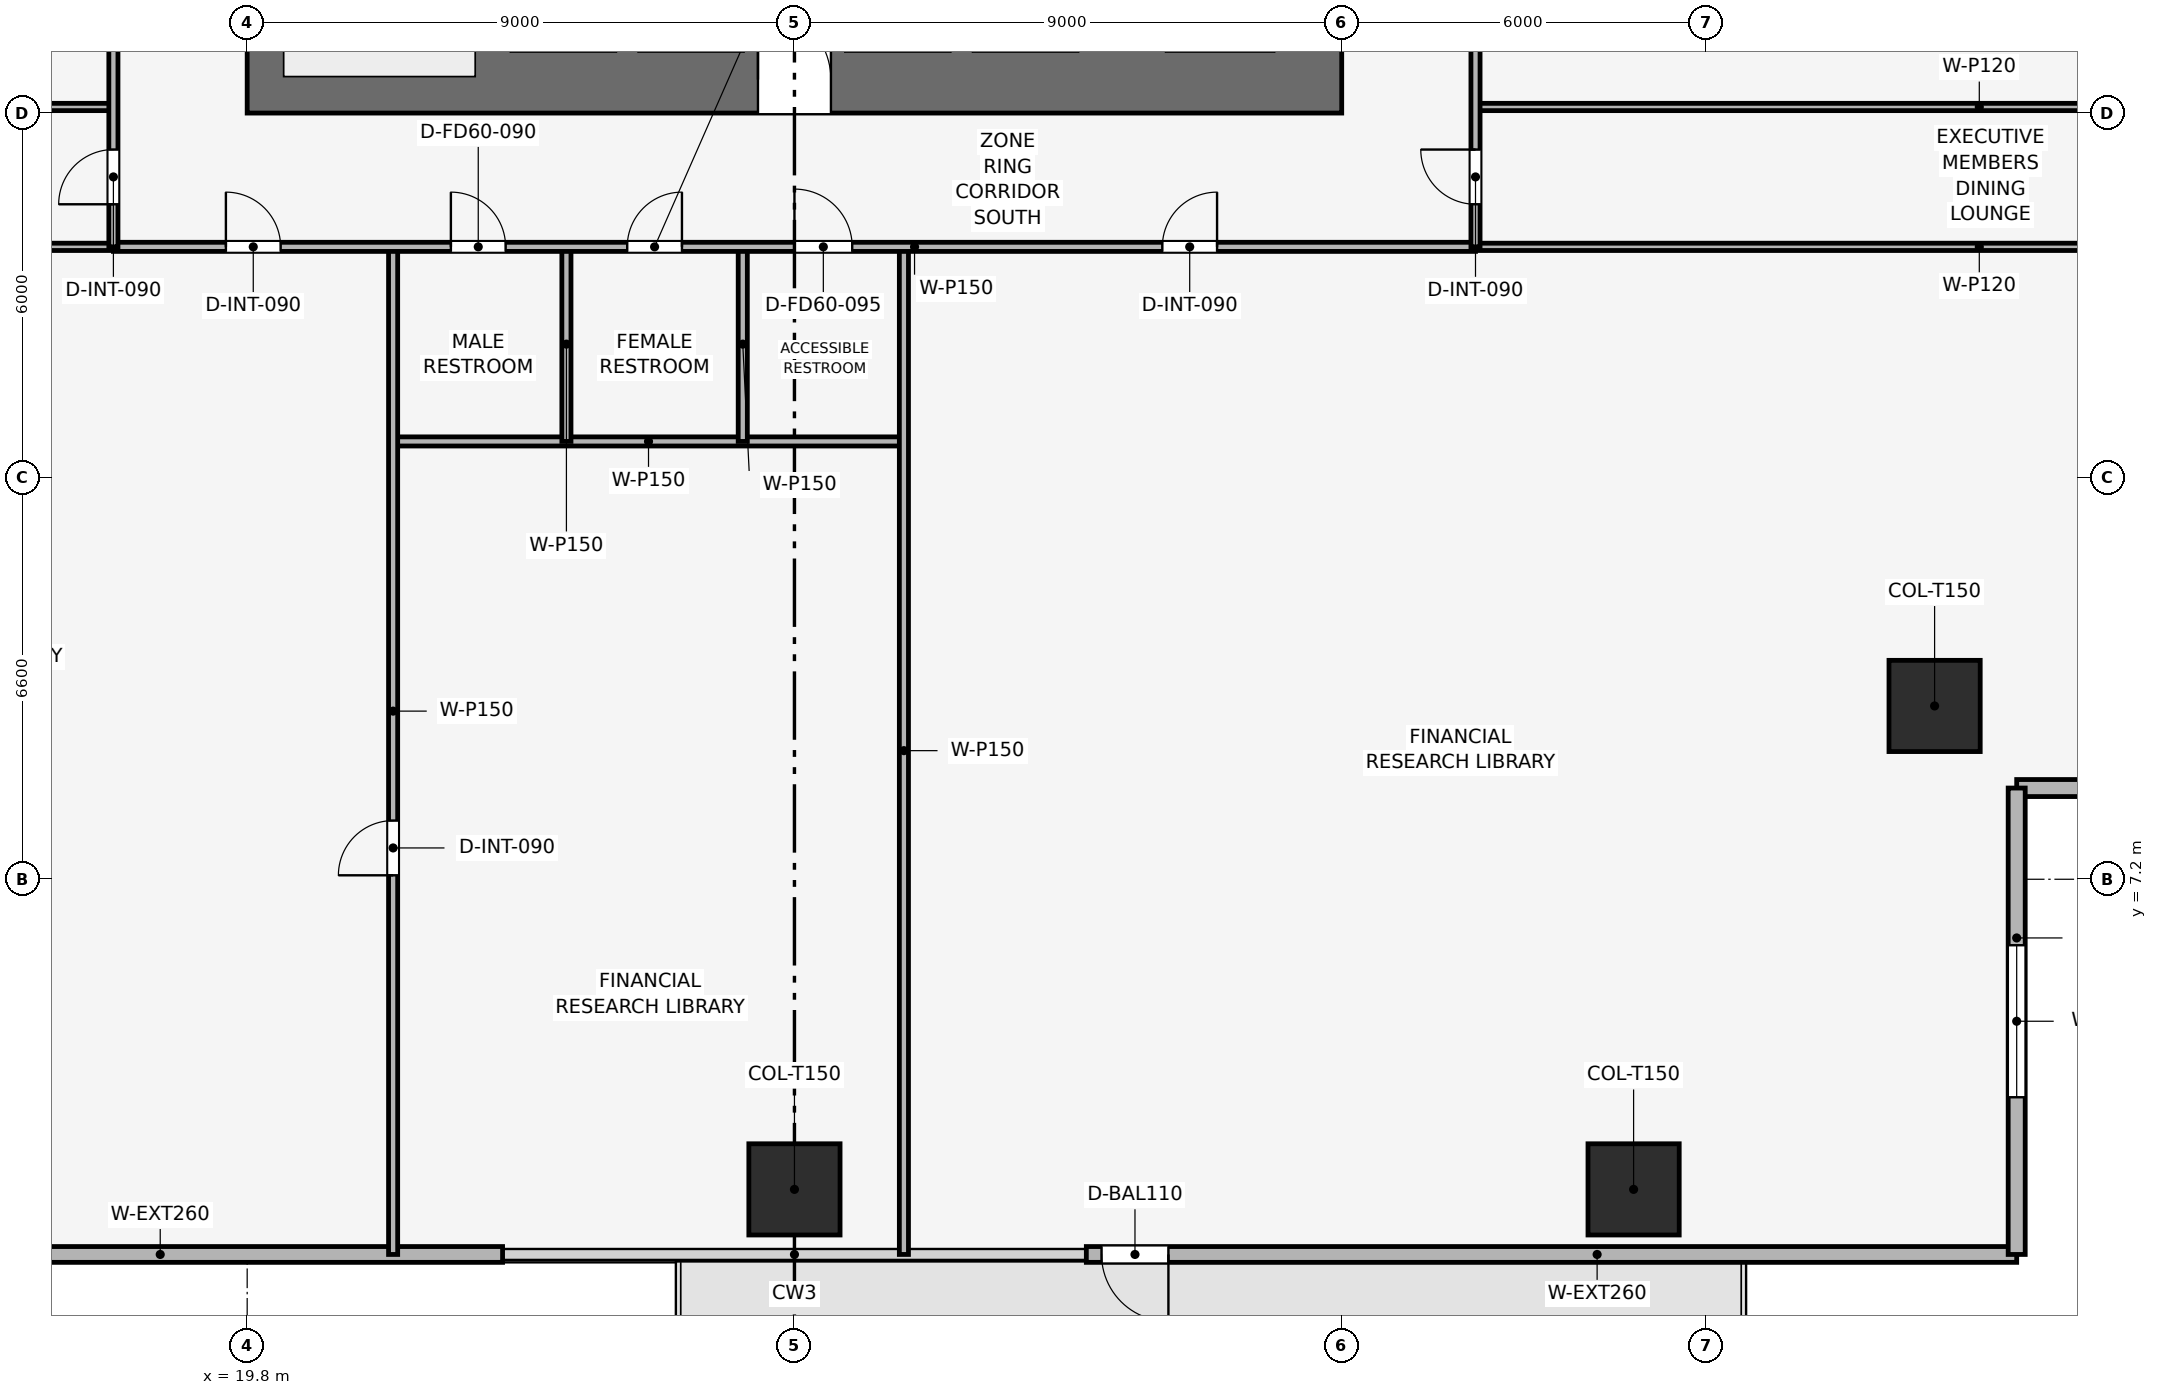
"""IFC4 building model, lengths in metres.
Left out: names, types, materials, properties, quantities, classifications, styles, units other than length and angle.
Written with IfcOpenShell. Run it as: python <this file> out.ifc"""

import sys

from ifc_helpers import new_model, si_unit, direction, frame, frame_2d, origin, origin_2d, place, context, subcontext, project, spatial, rectangle, extrude, element, fill, save


model = new_model("IFC4")
c1 = context("Model", 3, precision=1e-05, world=origin(), true_north=direction((0.0, 1.0)))
c2 = subcontext(c1, "Body", "Model", "MODEL_VIEW")
j1 = project(units=[si_unit("LENGTHUNIT", "METRE"), si_unit("PLANEANGLEUNIT", "RADIAN")], contexts=[c1])
p1 = place(None, origin())
s1 = spatial("IfcSite", under=j1, at=p1, CompositionType="ELEMENT")
p2 = place(p1, origin())
s2 = spatial("IfcBuilding", under=s1, at=p2, CompositionType="ELEMENT")
p3 = place(p2, frame((0.0, 0.0, 37.8)))
s3 = spatial("IfcBuildingStorey", under=s2, at=p3, CompositionType="ELEMENT", Elevation=37.8)
p4 = place(p3, frame((19.8, 20.35, 0.0), z_axis=(0.0, 0.0, 1.0), x_axis=(1.0, 0.0, 0.0)))
e1 = element("IfcWall", 1, at=p4, inside=s3, PredefinedType="SHEAR", context=c2, shape_type="SweptSolid", body=[
    extrude(rectangle(XDim=18.0, YDim=1.1, at=frame_2d((9.0, 0.0))), origin(), (0.0, 0.0, 1.0), 3.9),
])
p5 = place(p4, frame((8.4, 0.0, 0.0)))
e2 = element("IfcOpeningElement", 2, at=p5, cuts=e1, PredefinedType="OPENING", context=c2, shape_type="SweptSolid", body=[
    extrude(rectangle(XDim=1.2, YDim=2.2, at=frame_2d((0.6, 1.1))), frame((0.0, 0.56, 0.0), z_axis=(0.0, -1.0, 0.0), x_axis=(1.0, 0.0, 0.0)), (0.0, 0.0, 1.0), 1.12),
])
for number, where, z_axis, x_axis in (
    (3, (28.8, 2.1, 0.003), (0.0, 0.0, 1.0), (1.0, 0.0, 0.0)),
    (4, (42.6, 2.1, 0.003), (0.0, 0.0, 1.0), (1.0, 0.0, 0.0)),
    (5, (47.55, 10.05, 0.003), (0.0, 0.0, 1.0), (1.0, 0.0, 0.0)),
):
    element("IfcColumn", number, at=place(p3, frame(where, z_axis=z_axis, x_axis=x_axis)), inside=s3, PredefinedType="COLUMN", context=c2, shape_type="SweptSolid", body=[
        extrude(rectangle(XDim=1.5, YDim=1.5, at=origin_2d()), origin(), (0.0, 0.0, 1.0), 3.644),
    ])
p6 = place(p3, frame((48.9, 1.03, 0.0), z_axis=(0.0, 0.0, 1.0), x_axis=(-1.0, 0.0, 0.0)))
e6 = element("IfcWall", 6, at=p6, inside=s3, PredefinedType="SOLIDWALL", context=c2, shape_type="SweptSolid", body=[
    extrude(rectangle(XDim=15.3, YDim=0.26, at=frame_2d((7.65, 0.0))), origin(), (0.0, 0.0, 1.0), 3.65),
])
p7 = place(p6, frame((13.95, 0.0, 0.0)))
e7 = element("IfcOpeningElement", 7, at=p7, cuts=e6, PredefinedType="OPENING", context=c2, shape_type="SweptSolid", body=[
    extrude(rectangle(XDim=1.1, YDim=2.2, at=frame_2d((0.55, 1.1))), frame((0.0, 0.14, 0.0), z_axis=(0.0, -1.0, 0.0), x_axis=(1.0, 0.0, 0.0)), (0.0, 0.0, 1.0), 0.28),
])
p8 = place(p3, frame((24.0, 1.03, 0.0), z_axis=(0.0, 0.0, 1.0), x_axis=(-1.0, 0.0, 0.0)))
e8 = element("IfcWall", 8, at=p8, inside=s3, PredefinedType="SOLIDWALL", context=c2, shape_type="SweptSolid", body=[
    extrude(rectangle(XDim=15.3, YDim=0.26, at=frame_2d((7.65, 0.0))), origin(), (0.0, 0.0, 1.0), 3.65),
])
p9 = place(p8, frame((11.25, 0.0, 0.9)))
e9 = element("IfcOpeningElement", 9, at=p9, cuts=e8, PredefinedType="OPENING", context=c2, shape_type="SweptSolid", body=[
    extrude(rectangle(XDim=3.8, YDim=1.9, at=frame_2d((1.9, 0.95))), frame((0.0, 0.14, 0.0), z_axis=(0.0, -1.0, 0.0), x_axis=(1.0, 0.0, 0.0)), (0.0, 0.0, 1.0), 0.28),
])
p10 = place(p3, frame((56.57, 8.7, 0.0), z_axis=(0.0, 0.0, 1.0), x_axis=(-1.0, 0.0, 0.0)))
e10 = element("IfcWall", 10, at=p10, inside=s3, PredefinedType="SOLIDWALL", context=c2, shape_type="SweptSolid", body=[
    extrude(rectangle(XDim=7.67, YDim=0.28, at=frame_2d((3.835, 0.0))), origin(), (0.0, 0.0, 1.0), 3.65),
])
p11 = place(p10, frame((2.585, 0.0, 0.9)))
e11 = element("IfcOpeningElement", 11, at=p11, cuts=e10, PredefinedType="OPENING", context=c2, shape_type="SweptSolid", body=[
    extrude(rectangle(XDim=2.5, YDim=1.9, at=frame_2d((1.25, 0.95))), frame((0.0, 0.15, 0.0), z_axis=(0.0, -1.0, 0.0), x_axis=(1.0, 0.0, 0.0)), (0.0, 0.0, 1.0), 0.3),
])
p12 = place(p3, frame((48.9, 8.7, 0.0), z_axis=(0.0, 0.0, 1.0), x_axis=(0.0, -1.0, 0.0)))
e12 = element("IfcWall", 12, at=p12, inside=s3, PredefinedType="SOLIDWALL", context=c2, shape_type="SweptSolid", body=[
    extrude(rectangle(XDim=7.67, YDim=0.28, at=frame_2d((3.835, 0.0))), origin(), (0.0, 0.0, 1.0), 3.65),
])
p13 = place(p12, frame((2.585, 0.0, 0.9)))
e13 = element("IfcOpeningElement", 13, at=p13, cuts=e12, PredefinedType="OPENING", context=c2, shape_type="SweptSolid", body=[
    extrude(rectangle(XDim=2.5, YDim=1.9, at=frame_2d((1.25, 0.95))), frame((0.0, 0.15, 0.0), z_axis=(0.0, -1.0, 0.0), x_axis=(1.0, 0.0, 0.0)), (0.0, 0.0, 1.0), 0.3),
])
p14 = place(p3, frame((22.2, 14.4, 0.0), z_axis=(0.0, 0.0, 1.0), x_axis=(1.0, 0.0, 0.0)))
e14 = element("IfcWall", 14, at=p14, inside=s3, PredefinedType="PARTITIONING", context=c2, shape_type="SweptSolid", body=[
    extrude(rectangle(XDim=8.4, YDim=0.15, at=frame_2d((4.2, 0.0))), origin(), (0.0, 0.0, 1.0), 3.085),
])
p15 = place(p3, frame((22.2, 1.03, 0.0), z_axis=(0.0, 0.0, 1.0), x_axis=(0.0, 1.0, 0.0)))
e15 = element("IfcWall", 15, at=p15, inside=s3, PredefinedType="PARTITIONING", context=c2, shape_type="SweptSolid", body=[
    extrude(rectangle(XDim=16.57, YDim=0.15, at=frame_2d((8.285, 0.0))), origin(), (0.0, 0.0, 1.0), 2.935),
])
p16 = place(p15, frame((6.235, 0.0, 0.0)))
e16 = element("IfcOpeningElement", 16, at=p16, cuts=e15, PredefinedType="OPENING", context=c2, shape_type="SweptSolid", body=[
    extrude(rectangle(XDim=0.9, YDim=2.1, at=frame_2d((0.45, 1.05))), frame((0.0, 0.085, 0.0), z_axis=(0.0, -1.0, 0.0), x_axis=(1.0, 0.0, 0.0)), (0.0, 0.0, 1.0), 0.17),
])
p17 = place(p3, frame((30.6, 1.03, 0.0), z_axis=(0.0, 0.0, 1.0), x_axis=(0.0, 1.0, 0.0)))
e17 = element("IfcWall", 17, at=p17, inside=s3, PredefinedType="PARTITIONING", context=c2, shape_type="SweptSolid", body=[
    extrude(rectangle(XDim=16.57, YDim=0.15, at=frame_2d((8.285, 0.0))), origin(), (0.0, 0.0, 1.0), 2.935),
])
for number, where, z_axis, x_axis in (
    (18, (25.05, 14.4, 0.0), (0.0, 0.0, 1.0), (0.0, 1.0, 0.0)),
    (19, (27.95, 14.4, 0.0), (0.0, 0.0, 1.0), (0.0, 1.0, 0.0)),
):
    element("IfcWall", number, at=place(p3, frame(where, z_axis=z_axis, x_axis=x_axis)), inside=s3, PredefinedType="PARTITIONING", context=c2, shape_type="SweptSolid", body=[
        extrude(rectangle(XDim=3.2, YDim=0.15, at=frame_2d((1.6, 0.0))), origin(), (0.0, 0.0, 1.0), 3.65),
    ])
for number, where, z_axis, x_axis in (
    (20, (1.03, 17.6, 0.0), (0.0, 0.0, 1.0), (1.0, 0.0, 0.0)),
    (21, (40.0, 17.6, 0.0), (0.0, 0.0, 1.0), (1.0, 0.0, 0.0)),
    (22, (1.03, 19.9, 0.0), (0.0, 0.0, 1.0), (1.0, 0.0, 0.0)),
    (23, (40.0, 19.9, 0.0), (0.0, 0.0, 1.0), (1.0, 0.0, 0.0)),
):
    element("IfcWall", number, at=place(p3, frame(where, z_axis=z_axis, x_axis=x_axis)), inside=s3, PredefinedType="PARTITIONING", context=c2, shape_type="SweptSolid", body=[
        extrude(rectangle(XDim=16.57, YDim=0.12, at=frame_2d((8.285, 0.0))), origin(), (0.0, 0.0, 1.0), 2.935),
    ])
p18 = place(p3, frame((17.6, 17.6, 0.0), z_axis=(0.0, 0.0, 1.0), x_axis=(1.0, 0.0, 0.0)))
e24 = element("IfcWall", 24, at=p18, inside=s3, PredefinedType="PARTITIONING", context=c2, shape_type="SweptSolid", body=[
    extrude(rectangle(XDim=22.4, YDim=0.15, at=frame_2d((11.2, 0.0))), origin(), (0.0, 0.0, 1.0), 3.085),
])
p19 = place(p18, frame((1.85, 0.0, 0.0)))
e25 = element("IfcOpeningElement", 25, at=p19, cuts=e24, PredefinedType="OPENING", context=c2, shape_type="SweptSolid", body=[
    extrude(rectangle(XDim=0.9, YDim=2.1, at=frame_2d((0.45, 1.05))), frame((0.0, 0.085, 0.0), z_axis=(0.0, -1.0, 0.0), x_axis=(1.0, 0.0, 0.0)), (0.0, 0.0, 1.0), 0.17),
])
p20 = place(p18, frame((5.55, 0.0, 0.0)))
e26 = element("IfcOpeningElement", 26, at=p20, cuts=e24, PredefinedType="OPENING", context=c2, shape_type="SweptSolid", body=[
    extrude(rectangle(XDim=0.9, YDim=2.1, at=frame_2d((0.45, 1.05))), frame((0.0, 0.085, 0.0), z_axis=(0.0, -1.0, 0.0), x_axis=(1.0, 0.0, 0.0)), (0.0, 0.0, 1.0), 0.17),
])
p21 = place(p18, frame((8.45, 0.0, 0.0)))
e27 = element("IfcOpeningElement", 27, at=p21, cuts=e24, PredefinedType="OPENING", context=c2, shape_type="SweptSolid", body=[
    extrude(rectangle(XDim=0.9, YDim=2.1, at=frame_2d((0.45, 1.05))), frame((0.0, 0.085, 0.0), z_axis=(0.0, -1.0, 0.0), x_axis=(1.0, 0.0, 0.0)), (0.0, 0.0, 1.0), 0.17),
])
p22 = place(p18, frame((11.2, 0.0, 0.0)))
e28 = element("IfcOpeningElement", 28, at=p22, cuts=e24, PredefinedType="OPENING", context=c2, shape_type="SweptSolid", body=[
    extrude(rectangle(XDim=0.95, YDim=2.1, at=frame_2d((0.475, 1.05))), frame((0.0, 0.085, 0.0), z_axis=(0.0, -1.0, 0.0), x_axis=(1.0, 0.0, 0.0)), (0.0, 0.0, 1.0), 0.17),
])
p23 = place(p18, frame((17.25, 0.0, 0.0)))
e29 = element("IfcOpeningElement", 29, at=p23, cuts=e24, PredefinedType="OPENING", context=c2, shape_type="SweptSolid", body=[
    extrude(rectangle(XDim=0.9, YDim=2.1, at=frame_2d((0.45, 1.05))), frame((0.0, 0.085, 0.0), z_axis=(0.0, -1.0, 0.0), x_axis=(1.0, 0.0, 0.0)), (0.0, 0.0, 1.0), 0.17),
])
p24 = place(p3, frame((17.6, 17.6, 0.0), z_axis=(0.0, 0.0, 1.0), x_axis=(0.0, 1.0, 0.0)))
e30 = element("IfcWall", 30, at=p24, inside=s3, PredefinedType="PARTITIONING", context=c2, shape_type="SweptSolid", body=[
    extrude(rectangle(XDim=22.4, YDim=0.15, at=frame_2d((11.2, 0.0))), origin(), (0.0, 0.0, 1.0), 3.085),
])
p25 = place(p24, frame((0.7, 0.0, 0.0)))
e31 = element("IfcOpeningElement", 31, at=p25, cuts=e30, PredefinedType="OPENING", context=c2, shape_type="SweptSolid", body=[
    extrude(rectangle(XDim=0.9, YDim=2.1, at=frame_2d((0.45, 1.05))), frame((0.0, 0.085, 0.0), z_axis=(0.0, -1.0, 0.0), x_axis=(1.0, 0.0, 0.0)), (0.0, 0.0, 1.0), 0.17),
])
p26 = place(p24, frame((6.365, 0.0, 0.0)))
e32 = element("IfcOpeningElement", 32, at=p26, cuts=e30, PredefinedType="OPENING", context=c2, shape_type="SweptSolid", body=[
    extrude(rectangle(XDim=0.9, YDim=2.1, at=frame_2d((0.45, 1.05))), frame((0.0, 0.085, 0.0), z_axis=(0.0, -1.0, 0.0), x_axis=(1.0, 0.0, 0.0)), (0.0, 0.0, 1.0), 0.17),
])
p27 = place(p24, frame((16.415, 0.0, 0.0)))
e33 = element("IfcOpeningElement", 33, at=p27, cuts=e30, PredefinedType="OPENING", context=c2, shape_type="SweptSolid", body=[
    extrude(rectangle(XDim=0.9, YDim=2.1, at=frame_2d((0.45, 1.05))), frame((0.0, 0.085, 0.0), z_axis=(0.0, -1.0, 0.0), x_axis=(1.0, 0.0, 0.0)), (0.0, 0.0, 1.0), 0.17),
])
p28 = place(p3, frame((40.0, 17.6, 0.0), z_axis=(0.0, 0.0, 1.0), x_axis=(0.0, 1.0, 0.0)))
e34 = element("IfcWall", 34, at=p28, inside=s3, PredefinedType="PARTITIONING", context=c2, shape_type="SweptSolid", body=[
    extrude(rectangle(XDim=22.4, YDim=0.15, at=frame_2d((11.2, 0.0))), origin(), (0.0, 0.0, 1.0), 3.085),
])
p29 = place(p28, frame((0.7, 0.0, 0.0)))
e35 = element("IfcOpeningElement", 35, at=p29, cuts=e34, PredefinedType="OPENING", context=c2, shape_type="SweptSolid", body=[
    extrude(rectangle(XDim=0.9, YDim=2.1, at=frame_2d((0.45, 1.05))), frame((0.0, 0.085, 0.0), z_axis=(0.0, -1.0, 0.0), x_axis=(1.0, 0.0, 0.0)), (0.0, 0.0, 1.0), 0.17),
])
p30 = place(p28, frame((4.699, 0.0, 0.0)))
e36 = element("IfcOpeningElement", 36, at=p30, cuts=e34, PredefinedType="OPENING", context=c2, shape_type="SweptSolid", body=[
    extrude(rectangle(XDim=0.9, YDim=2.1, at=frame_2d((0.45, 1.05))), frame((0.0, 0.085, 0.0), z_axis=(0.0, -1.0, 0.0), x_axis=(1.0, 0.0, 0.0)), (0.0, 0.0, 1.0), 0.17),
])
p31 = place(p28, frame((10.692, 0.0, 0.0)))
e37 = element("IfcOpeningElement", 37, at=p31, cuts=e34, PredefinedType="OPENING", context=c2, shape_type="SweptSolid", body=[
    extrude(rectangle(XDim=0.9, YDim=2.1, at=frame_2d((0.45, 1.05))), frame((0.0, 0.085, 0.0), z_axis=(0.0, -1.0, 0.0), x_axis=(1.0, 0.0, 0.0)), (0.0, 0.0, 1.0), 0.17),
])
p32 = place(p28, frame((17.892, 0.0, 0.0)))
e38 = element("IfcOpeningElement", 38, at=p32, cuts=e34, PredefinedType="OPENING", context=c2, shape_type="SweptSolid", body=[
    extrude(rectangle(XDim=0.9, YDim=2.1, at=frame_2d((0.45, 1.05))), frame((0.0, 0.085, 0.0), z_axis=(0.0, -1.0, 0.0), x_axis=(1.0, 0.0, 0.0)), (0.0, 0.0, 1.0), 0.17),
])
p33 = place(p7, origin())
e39 = element("IfcDoor", 39, at=p33, inside=s3, OperationType="SINGLE_SWING_LEFT", PredefinedType="DOOR", context=c2, shape_type="SweptSolid", body=[
    extrude(rectangle(XDim=1.1, YDim=2.2, at=frame_2d((0.55, 1.1))), frame((0.0, 0.025, 0.0), z_axis=(0.0, -1.0, 0.0), x_axis=(1.0, 0.0, 0.0)), (0.0, 0.0, 1.0), 0.05),
])
fill(e7, e39)
p34 = place(p13, origin())
e40 = element("IfcWindow", 40, at=p34, inside=s3, PartitioningType="SINGLE_PANEL", PredefinedType="WINDOW", context=c2, shape_type="SweptSolid", body=[
    extrude(rectangle(XDim=2.5, YDim=1.9, at=frame_2d((1.25, 0.95))), frame((0.0, 0.03, 0.0), z_axis=(0.0, -1.0, 0.0), x_axis=(1.0, 0.0, 0.0)), (0.0, 0.0, 1.0), 0.06),
])
fill(e13, e40)
p35 = place(p16, origin())
e41 = element("IfcDoor", 41, at=p35, inside=s3, OperationType="SINGLE_SWING_LEFT", PredefinedType="DOOR", context=c2, shape_type="SweptSolid", body=[
    extrude(rectangle(XDim=0.9, YDim=2.1, at=frame_2d((0.45, 1.05))), frame((0.0, 0.025, 0.0), z_axis=(0.0, -1.0, 0.0), x_axis=(1.0, 0.0, 0.0)), (0.0, 0.0, 1.0), 0.05),
])
fill(e16, e41)
p36 = place(p19, origin())
e42 = element("IfcDoor", 42, at=p36, inside=s3, OperationType="SINGLE_SWING_LEFT", PredefinedType="DOOR", context=c2, shape_type="SweptSolid", body=[
    extrude(rectangle(XDim=0.9, YDim=2.1, at=frame_2d((0.45, 1.05))), frame((0.0, 0.025, 0.0), z_axis=(0.0, -1.0, 0.0), x_axis=(1.0, 0.0, 0.0)), (0.0, 0.0, 1.0), 0.05),
])
fill(e25, e42)
p37 = place(p20, origin())
e43 = element("IfcDoor", 43, at=p37, inside=s3, OperationType="SINGLE_SWING_LEFT", PredefinedType="DOOR", context=c2, shape_type="SweptSolid", body=[
    extrude(rectangle(XDim=0.9, YDim=2.1, at=frame_2d((0.45, 1.05))), frame((0.0, 0.025, 0.0), z_axis=(0.0, -1.0, 0.0), x_axis=(1.0, 0.0, 0.0)), (0.0, 0.0, 1.0), 0.05),
])
fill(e26, e43)
p38 = place(p21, origin())
e44 = element("IfcDoor", 44, at=p38, inside=s3, OperationType="SINGLE_SWING_RIGHT", PredefinedType="DOOR", context=c2, shape_type="SweptSolid", body=[
    extrude(rectangle(XDim=0.9, YDim=2.1, at=frame_2d((0.45, 1.05))), frame((0.0, 0.025, 0.0), z_axis=(0.0, -1.0, 0.0), x_axis=(1.0, 0.0, 0.0)), (0.0, 0.0, 1.0), 0.05),
])
fill(e27, e44)
p39 = place(p22, origin())
e45 = element("IfcDoor", 45, at=p39, inside=s3, OperationType="SINGLE_SWING_LEFT", PredefinedType="DOOR", context=c2, shape_type="SweptSolid", body=[
    extrude(rectangle(XDim=0.95, YDim=2.1, at=frame_2d((0.475, 1.05))), frame((0.0, 0.025, 0.0), z_axis=(0.0, -1.0, 0.0), x_axis=(1.0, 0.0, 0.0)), (0.0, 0.0, 1.0), 0.05),
])
fill(e28, e45)
p40 = place(p23, origin())
e46 = element("IfcDoor", 46, at=p40, inside=s3, OperationType="SINGLE_SWING_RIGHT", PredefinedType="DOOR", context=c2, shape_type="SweptSolid", body=[
    extrude(rectangle(XDim=0.9, YDim=2.1, at=frame_2d((0.45, 1.05))), frame((0.0, 0.025, 0.0), z_axis=(0.0, -1.0, 0.0), x_axis=(1.0, 0.0, 0.0)), (0.0, 0.0, 1.0), 0.05),
])
fill(e29, e46)
p41 = place(p25, origin())
e47 = element("IfcDoor", 47, at=p41, inside=s3, OperationType="SINGLE_SWING_LEFT", PredefinedType="DOOR", context=c2, shape_type="SweptSolid", body=[
    extrude(rectangle(XDim=0.9, YDim=2.1, at=frame_2d((0.45, 1.05))), frame((0.0, 0.025, 0.0), z_axis=(0.0, -1.0, 0.0), x_axis=(1.0, 0.0, 0.0)), (0.0, 0.0, 1.0), 0.05),
])
fill(e31, e47)
p42 = place(p29, origin())
e48 = element("IfcDoor", 48, at=p42, inside=s3, OperationType="SINGLE_SWING_RIGHT", PredefinedType="DOOR", context=c2, shape_type="SweptSolid", body=[
    extrude(rectangle(XDim=0.9, YDim=2.1, at=frame_2d((0.45, 1.05))), frame((0.0, 0.025, 0.0), z_axis=(0.0, -1.0, 0.0), x_axis=(1.0, 0.0, 0.0)), (0.0, 0.0, 1.0), 0.05),
])
fill(e35, e48)
p43 = place(p5, origin())
e49 = element("IfcDoor", 49, at=p43, inside=s3, OperationType="SINGLE_SWING_LEFT", PredefinedType="DOOR", context=c2, shape_type="SweptSolid", body=[
    extrude(rectangle(XDim=1.2, YDim=2.2, at=frame_2d((0.6, 1.1))), frame((0.0, 0.025, 0.0), z_axis=(0.0, -1.0, 0.0), x_axis=(1.0, 0.0, 0.0)), (0.0, 0.0, 1.0), 0.05),
])
fill(e2, e49)
save(model, sys.argv[1])
